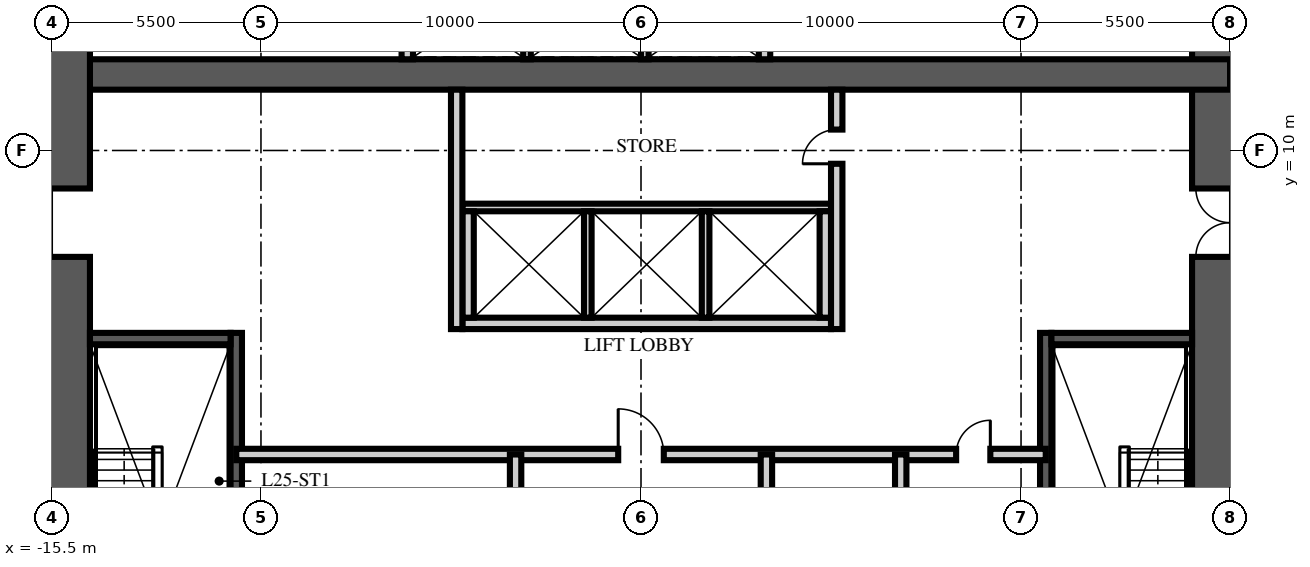
"""IFC4 building model, lengths in metres.
Left out: names, types, materials, properties, quantities, classifications, styles, units other than length and angle.
Written with IfcOpenShell. Run it as: python <this file> out.ifc"""

import sys

from ifc_helpers import new_model, si_unit, direction, frame, frame_2d, origin, place, context, subcontext, project, spatial, rectangle, extrude, element, fill, save


model = new_model("IFC4")
c1 = context("Model", 3, precision=1e-05, world=origin(), true_north=direction((0.0, 1.0)))
c2 = subcontext(c1, "Body", "Model", "MODEL_VIEW")
j1 = project(units=[si_unit("LENGTHUNIT", "METRE"), si_unit("PLANEANGLEUNIT", "RADIAN")], contexts=[c1])
p1 = place(None, origin())
s1 = spatial("IfcSite", under=j1, at=p1, CompositionType="ELEMENT")
p2 = place(p1, origin())
s2 = spatial("IfcBuilding", under=s1, at=p2, CompositionType="ELEMENT")
p3 = place(p2, frame((0.0, 0.0, 99.75)))
s3 = spatial("IfcBuildingStorey", under=s2, at=p3, CompositionType="ELEMENT", Elevation=99.75)
p4 = place(p3, frame((15.5, -15.5, -0.35), z_axis=(0.0, 0.0, 1.0), x_axis=(0.0, 1.0, 0.0)))
e1 = element("IfcWall", 1, at=p4, inside=s3, PredefinedType="SHEAR", context=c2, shape_type="SweptSolid", body=[
    extrude(rectangle(XDim=31.0, YDim=2.0, at=frame_2d((15.5, 0.0))), origin(), (0.0, 0.0, 1.0), 7.6),
])
p5 = place(p4, frame((6.5, 0.0, 0.35)))
e2 = element("IfcOpeningElement", 2, at=p5, cuts=e1, PredefinedType="OPENING", context=c2, shape_type="SweptSolid", body=[
    extrude(rectangle(XDim=1.2, YDim=2.1, at=frame_2d((0.6, 1.05))), frame((0.0, 1.01, 0.0), z_axis=(0.0, -1.0, 0.0), x_axis=(1.0, 0.0, 0.0)), (0.0, 0.0, 1.0), 2.02),
])
p6 = place(p4, frame((22.7, 0.0, 0.35)))
e3 = element("IfcOpeningElement", 3, at=p6, cuts=e1, PredefinedType="OPENING", context=c2, shape_type="SweptSolid", body=[
    extrude(rectangle(XDim=1.8, YDim=2.1, at=frame_2d((0.9, 1.05))), frame((0.0, 1.01, 0.0), z_axis=(0.0, -1.0, 0.0), x_axis=(1.0, 0.0, 0.0)), (0.0, 0.0, 1.0), 2.02),
])
p7 = place(p3, frame((-15.5, 12.0, -0.35), z_axis=(0.0, 0.0, 1.0), x_axis=(1.0, 0.0, 0.0)))
e4 = element("IfcWall", 4, at=p7, inside=s3, PredefinedType="SHEAR", context=c2, shape_type="SweptSolid", body=[
    extrude(rectangle(XDim=31.0, YDim=0.8, at=frame_2d((15.5, 0.0))), origin(), (0.0, 0.0, 1.0), 7.6),
])
p8 = place(p3, frame((-15.5, -15.5, -0.35), z_axis=(0.0, 0.0, 1.0), x_axis=(0.0, 1.0, 0.0)))
e5 = element("IfcWall", 5, at=p8, inside=s3, PredefinedType="SHEAR", context=c2, shape_type="SweptSolid", body=[
    extrude(rectangle(XDim=31.0, YDim=2.0, at=frame_2d((15.5, 0.0))), origin(), (0.0, 0.0, 1.0), 7.6),
])
p9 = place(p8, frame((6.5, 0.0, 0.35)))
e6 = element("IfcOpeningElement", 6, at=p9, cuts=e5, PredefinedType="OPENING", context=c2, shape_type="SweptSolid", body=[
    extrude(rectangle(XDim=1.2, YDim=2.1, at=frame_2d((0.6, 1.05))), frame((0.0, 1.01, 0.0), z_axis=(0.0, -1.0, 0.0), x_axis=(1.0, 0.0, 0.0)), (0.0, 0.0, 1.0), 2.02),
])
p10 = place(p8, frame((22.7, 0.0, 0.35)))
e7 = element("IfcOpeningElement", 7, at=p10, cuts=e5, PredefinedType="OPENING", context=c2, shape_type="SweptSolid", body=[
    extrude(rectangle(XDim=1.8, YDim=2.1, at=frame_2d((0.9, 1.05))), frame((0.0, 1.01, 0.0), z_axis=(0.0, -1.0, 0.0), x_axis=(1.0, 0.0, 0.0)), (0.0, 0.0, 1.0), 2.02),
])
p11 = place(p3, frame((-10.65, -4.9, 0.0), z_axis=(0.0, 0.0, 1.0), x_axis=(0.0, 1.0, 0.0)))
e8 = element("IfcWall", 8, at=p11, inside=s3, PredefinedType="SOLIDWALL", context=c2, shape_type="SweptSolid", body=[
    extrude(rectangle(XDim=10.1, YDim=0.3, at=frame_2d((5.05, 0.0))), origin(), (0.0, 0.0, 1.0), 7.25),
])
p12 = place(p3, frame((-14.5, 5.05, 0.0), z_axis=(0.0, 0.0, 1.0), x_axis=(1.0, 0.0, 0.0)))
e9 = element("IfcWall", 9, at=p12, inside=s3, PredefinedType="SOLIDWALL", context=c2, shape_type="SweptSolid", body=[
    extrude(rectangle(XDim=3.7, YDim=0.3, at=frame_2d((1.85, 0.0))), origin(), (0.0, 0.0, 1.0), 7.25),
])
p13 = place(p3, frame((10.65, -4.9, 0.0), z_axis=(0.0, 0.0, 1.0), x_axis=(0.0, 1.0, 0.0)))
e10 = element("IfcWall", 10, at=p13, inside=s3, PredefinedType="SOLIDWALL", context=c2, shape_type="SweptSolid", body=[
    extrude(rectangle(XDim=10.1, YDim=0.3, at=frame_2d((5.05, 0.0))), origin(), (0.0, 0.0, 1.0), 7.25),
])
p14 = place(p3, frame((14.5, 5.05, 0.0), z_axis=(0.0, 0.0, 1.0), x_axis=(-1.0, 0.0, 0.0)))
e11 = element("IfcWall", 11, at=p14, inside=s3, PredefinedType="SOLIDWALL", context=c2, shape_type="SweptSolid", body=[
    extrude(rectangle(XDim=3.7, YDim=0.3, at=frame_2d((1.85, 0.0))), origin(), (0.0, 0.0, 1.0), 7.25),
])
p15 = place(p3, frame((-4.7, 5.45, 0.0), z_axis=(0.0, 0.0, 1.0), x_axis=(1.0, 0.0, 0.0)))
e12 = element("IfcWall", 12, at=p15, inside=s3, PredefinedType="PARTITIONING", context=c2, shape_type="SweptSolid", body=[
    extrude(rectangle(XDim=9.7, YDim=0.3, at=frame_2d((4.85, 0.0))), origin(), (0.0, 0.0, 1.0), 7.25),
])
p16 = place(p3, frame((-4.7, 8.5, 0.0), z_axis=(0.0, 0.0, 1.0), x_axis=(1.0, 0.0, 0.0)))
e13 = element("IfcWall", 13, at=p16, inside=s3, PredefinedType="PARTITIONING", context=c2, shape_type="SweptSolid", body=[
    extrude(rectangle(XDim=9.7, YDim=0.2, at=frame_2d((4.85, 0.0))), origin(), (0.0, 0.0, 1.0), 7.25),
])
for number, where, z_axis, x_axis in (
    (14, (-4.55, 5.6, 0.0), (0.0, 0.0, 1.0), (0.0, 1.0, 0.0)),
    (15, (4.85, 5.6, 0.0), (0.0, 0.0, 1.0), (0.0, 1.0, 0.0)),
):
    element("IfcWall", number, at=place(p3, frame(where, z_axis=z_axis, x_axis=x_axis)), inside=s3, PredefinedType="PARTITIONING", context=c2, shape_type="SweptSolid", body=[
        extrude(rectangle(XDim=2.8, YDim=0.3, at=frame_2d((1.4, 0.0))), origin(), (0.0, 0.0, 1.0), 7.25),
    ])
for number, where, z_axis, x_axis in (
    (16, (-1.4, 5.6, 0.0), (0.0, 0.0, 1.0), (0.0, 1.0, 0.0)),
    (17, (1.7, 5.6, 0.0), (0.0, 0.0, 1.0), (0.0, 1.0, 0.0)),
):
    element("IfcWall", number, at=place(p3, frame(where, z_axis=z_axis, x_axis=x_axis)), inside=s3, PredefinedType="PARTITIONING", context=c2, shape_type="SweptSolid", body=[
        extrude(rectangle(XDim=2.8, YDim=0.2, at=frame_2d((1.4, 0.0))), origin(), (0.0, 0.0, 1.0), 7.25),
    ])
for number, where, z_axis, x_axis in (
    (18, (-6.15, 12.4, 0.0), (0.0, 0.0, 1.0), (0.0, 1.0, 0.0)),
    (19, (3.25, 12.4, 0.0), (0.0, 0.0, 1.0), (0.0, 1.0, 0.0)),
):
    element("IfcWall", number, at=place(p3, frame(where, z_axis=z_axis, x_axis=x_axis)), inside=s3, PredefinedType="PARTITIONING", context=c2, shape_type="SweptSolid", body=[
        extrude(rectangle(XDim=2.1, YDim=0.3, at=frame_2d((1.05, 0.0))), origin(), (0.0, 0.0, 1.0), 7.25),
    ])
for number, where, z_axis, x_axis in (
    (20, (-3.0, 12.4, 0.0), (0.0, 0.0, 1.0), (0.0, 1.0, 0.0)),
    (21, (0.1, 12.4, 0.0), (0.0, 0.0, 1.0), (0.0, 1.0, 0.0)),
):
    element("IfcWall", number, at=place(p3, frame(where, z_axis=z_axis, x_axis=x_axis)), inside=s3, PredefinedType="PARTITIONING", context=c2, shape_type="SweptSolid", body=[
        extrude(rectangle(XDim=2.1, YDim=0.2, at=frame_2d((1.05, 0.0))), origin(), (0.0, 0.0, 1.0), 7.25),
    ])
p17 = place(p3, frame((-10.65, 2.0, 0.0), z_axis=(0.0, 0.0, 1.0), x_axis=(1.0, 0.0, 0.0)))
e22 = element("IfcWall", 22, at=p17, inside=s3, PredefinedType="PARTITIONING", context=c2, shape_type="SweptSolid", body=[
    extrude(rectangle(XDim=21.3, YDim=0.3, at=frame_2d((10.65, 0.0))), origin(), (0.0, 0.0, 1.0), 7.25),
])
p18 = place(p17, frame((10.05, 0.0, 0.0)))
e23 = element("IfcOpeningElement", 23, at=p18, cuts=e22, PredefinedType="OPENING", context=c2, shape_type="SweptSolid", body=[
    extrude(rectangle(XDim=1.2, YDim=2.1, at=frame_2d((0.6, 1.05))), frame((0.0, 0.16, 0.0), z_axis=(0.0, -1.0, 0.0), x_axis=(1.0, 0.0, 0.0)), (0.0, 0.0, 1.0), 0.32),
])
p19 = place(p17, frame((18.942, 0.0, 0.0)))
e24 = element("IfcOpeningElement", 24, at=p19, cuts=e22, PredefinedType="OPENING", context=c2, shape_type="SweptSolid", body=[
    extrude(rectangle(XDim=0.9, YDim=2.1, at=frame_2d((0.45, 1.05))), frame((0.0, 0.16, 0.0), z_axis=(0.0, -1.0, 0.0), x_axis=(1.0, 0.0, 0.0)), (0.0, 0.0, 1.0), 0.32),
])
p20 = place(p3, frame((-3.3, -6.65, 0.0), z_axis=(0.0, 0.0, 1.0), x_axis=(0.0, 1.0, 0.0)))
e25 = element("IfcWall", 25, at=p20, inside=s3, PredefinedType="PARTITIONING", context=c2, shape_type="SweptSolid", body=[
    extrude(rectangle(XDim=8.65, YDim=0.3, at=frame_2d((4.325, 0.0))), origin(), (0.0, 0.0, 1.0), 7.25),
])
p21 = place(p20, frame((1.75, 0.0, 0.0)))
e26 = element("IfcOpeningElement", 26, at=p21, cuts=e25, PredefinedType="OPENING", context=c2, shape_type="SweptSolid", body=[
    extrude(rectangle(XDim=0.9, YDim=2.1, at=frame_2d((0.45, 1.05))), frame((0.0, 0.16, 0.0), z_axis=(0.0, -1.0, 0.0), x_axis=(1.0, 0.0, 0.0)), (0.0, 0.0, 1.0), 0.32),
])
p22 = place(p20, frame((6.075, 0.0, 0.0)))
e27 = element("IfcOpeningElement", 27, at=p22, cuts=e25, PredefinedType="OPENING", context=c2, shape_type="SweptSolid", body=[
    extrude(rectangle(XDim=0.9, YDim=2.1, at=frame_2d((0.45, 1.05))), frame((0.0, 0.16, 0.0), z_axis=(0.0, -1.0, 0.0), x_axis=(1.0, 0.0, 0.0)), (0.0, 0.0, 1.0), 0.32),
])
p23 = place(p3, frame((3.3, -6.65, 0.0), z_axis=(0.0, 0.0, 1.0), x_axis=(0.0, 1.0, 0.0)))
e28 = element("IfcWall", 28, at=p23, inside=s3, PredefinedType="PARTITIONING", context=c2, shape_type="SweptSolid", body=[
    extrude(rectangle(XDim=8.65, YDim=0.3, at=frame_2d((4.325, 0.0))), origin(), (0.0, 0.0, 1.0), 7.25),
])
p24 = place(p23, frame((3.875, 0.0, 0.0)))
e29 = element("IfcOpeningElement", 29, at=p24, cuts=e28, PredefinedType="OPENING", context=c2, shape_type="SweptSolid", body=[
    extrude(rectangle(XDim=0.9, YDim=2.1, at=frame_2d((0.45, 1.05))), frame((0.0, 0.16, 0.0), z_axis=(0.0, -1.0, 0.0), x_axis=(1.0, 0.0, 0.0)), (0.0, 0.0, 1.0), 0.32),
])
p25 = place(p3, frame((6.834, -6.65, 0.0), z_axis=(0.0, 0.0, 1.0), x_axis=(0.0, 1.0, 0.0)))
e30 = element("IfcWall", 30, at=p25, inside=s3, PredefinedType="PARTITIONING", context=c2, shape_type="SweptSolid", body=[
    extrude(rectangle(XDim=8.65, YDim=0.3, at=frame_2d((4.325, 0.0))), origin(), (0.0, 0.0, 1.0), 7.25),
])
p26 = place(p3, frame((-4.85, 5.3, 0.0), z_axis=(0.0, 0.0, 1.0), x_axis=(0.0, 1.0, 0.0)))
e31 = element("IfcWall", 31, at=p26, inside=s3, PredefinedType="PARTITIONING", context=c2, shape_type="SweptSolid", body=[
    extrude(rectangle(XDim=6.3, YDim=0.3, at=frame_2d((3.15, 0.0))), origin(), (0.0, 0.0, 1.0), 7.25),
])
p27 = place(p3, frame((5.15, 5.3, 0.0), z_axis=(0.0, 0.0, 1.0), x_axis=(0.0, 1.0, 0.0)))
e32 = element("IfcWall", 32, at=p27, inside=s3, PredefinedType="PARTITIONING", context=c2, shape_type="SweptSolid", body=[
    extrude(rectangle(XDim=6.3, YDim=0.3, at=frame_2d((3.15, 0.0))), origin(), (0.0, 0.0, 1.0), 7.25),
])
p28 = place(p27, frame((4.35, 0.0, 0.0)))
e33 = element("IfcOpeningElement", 33, at=p28, cuts=e32, PredefinedType="OPENING", context=c2, shape_type="SweptSolid", body=[
    extrude(rectangle(XDim=0.9, YDim=2.1, at=frame_2d((0.45, 1.05))), frame((0.0, 0.16, 0.0), z_axis=(0.0, -1.0, 0.0), x_axis=(1.0, 0.0, 0.0)), (0.0, 0.0, 1.0), 0.32),
])
p29 = place(p10, origin())
e34 = element("IfcDoor", 34, at=p29, inside=s3, OperationType="DOUBLE_DOOR_SINGLE_SWING", PredefinedType="DOOR", context=c2, shape_type="SweptSolid", body=[
    extrude(rectangle(XDim=1.8, YDim=2.1, at=frame_2d((0.9, 1.05))), frame((0.0, 0.025, 0.0), z_axis=(0.0, -1.0, 0.0), x_axis=(1.0, 0.0, 0.0)), (0.0, 0.0, 1.0), 0.05),
])
fill(e7, e34)
p30 = place(p6, origin())
e35 = element("IfcDoor", 35, at=p30, inside=s3, OperationType="DOUBLE_DOOR_SINGLE_SWING", PredefinedType="DOOR", context=c2, shape_type="SweptSolid", body=[
    extrude(rectangle(XDim=1.8, YDim=2.1, at=frame_2d((0.9, 1.05))), frame((0.0, 0.025, 0.0), z_axis=(0.0, -1.0, 0.0), x_axis=(1.0, 0.0, 0.0)), (0.0, 0.0, 1.0), 0.05),
])
fill(e3, e35)
p31 = place(p18, origin())
e36 = element("IfcDoor", 36, at=p31, inside=s3, OperationType="SINGLE_SWING_LEFT", PredefinedType="DOOR", context=c2, shape_type="SweptSolid", body=[
    extrude(rectangle(XDim=1.2, YDim=2.1, at=frame_2d((0.6, 1.05))), frame((0.0, 0.025, 0.0), z_axis=(0.0, -1.0, 0.0), x_axis=(1.0, 0.0, 0.0)), (0.0, 0.0, 1.0), 0.05),
])
fill(e23, e36)
p32 = place(p19, origin())
e37 = element("IfcDoor", 37, at=p32, inside=s3, OperationType="SINGLE_SWING_RIGHT", PredefinedType="DOOR", context=c2, shape_type="SweptSolid", body=[
    extrude(rectangle(XDim=0.9, YDim=2.1, at=frame_2d((0.45, 1.05))), frame((0.0, 0.025, 0.0), z_axis=(0.0, -1.0, 0.0), x_axis=(1.0, 0.0, 0.0)), (0.0, 0.0, 1.0), 0.05),
])
fill(e24, e37)
p33 = place(p28, origin())
e38 = element("IfcDoor", 38, at=p33, inside=s3, OperationType="SINGLE_SWING_LEFT", PredefinedType="DOOR", context=c2, shape_type="SweptSolid", body=[
    extrude(rectangle(XDim=0.9, YDim=2.1, at=frame_2d((0.45, 1.05))), frame((0.0, 0.025, 0.0), z_axis=(0.0, -1.0, 0.0), x_axis=(1.0, 0.0, 0.0)), (0.0, 0.0, 1.0), 0.05),
])
fill(e33, e38)
save(model, sys.argv[1])
